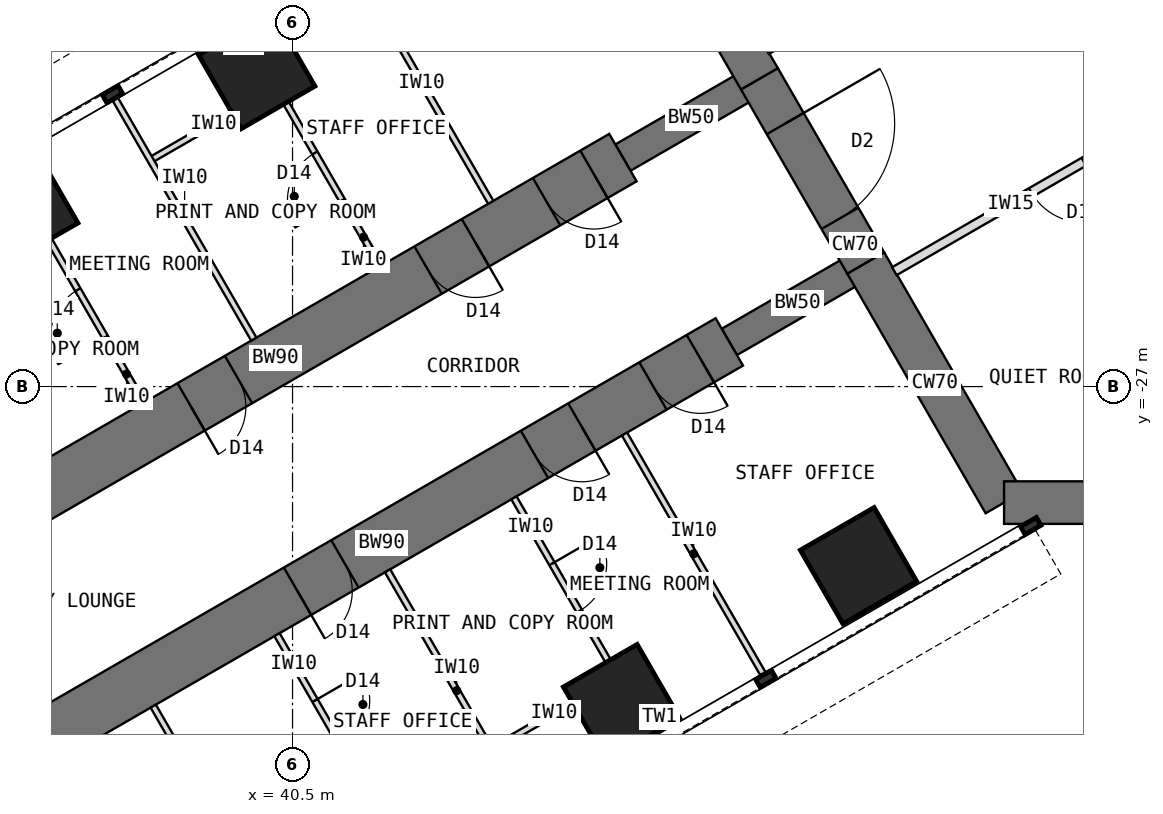
"""IFC4 building model, lengths in metres.
Left out: names, types, materials, properties, quantities, classifications, styles, units other than length and angle.
Written with IfcOpenShell. Run it as: python <this file> out.ifc"""

import sys

from ifc_helpers import new_model, si_unit, direction, frame, frame_2d, origin, origin_2d, place, context, subcontext, project, spatial, rectangle, extrude, element, fill, save


model = new_model("IFC4")
c1 = context("Model", 3, precision=1e-05, world=origin(), true_north=direction((0.0, 1.0)))
c2 = subcontext(c1, "Body", "Model", "MODEL_VIEW")
j1 = project(units=[si_unit("LENGTHUNIT", "METRE"), si_unit("PLANEANGLEUNIT", "RADIAN")], contexts=[c1])
p1 = place(None, origin())
s1 = spatial("IfcSite", under=j1, at=p1, CompositionType="ELEMENT")
p2 = place(p1, origin())
s2 = spatial("IfcBuilding", under=s1, at=p2, CompositionType="ELEMENT")
p3 = place(p2, frame((0.0, 0.0, 88.5)))
s3 = spatial("IfcBuildingStorey", under=s2, at=p3, CompositionType="ELEMENT", Elevation=88.5)
p4 = place(p3, frame((45.904, -18.0, 0.0), z_axis=(0.0, 0.0, 1.0), x_axis=(0.500024481964, -0.866011268655, 0.0)))
e1 = element("IfcWall", 1, at=p4, inside=s3, PredefinedType="SHEAR", context=c2, shape_type="SweptSolid", body=[
    extrude(rectangle(XDim=4.548, YDim=0.7, at=frame_2d((2.274, 0.0))), origin(), (0.0, 0.0, 1.0), 4.0),
])
p5 = place(p3, frame((48.178, -21.939, 0.0), z_axis=(0.0, 0.0, 1.0), x_axis=(0.500010275428, -0.866019471182, 0.0)))
e2 = element("IfcWall", 2, at=p5, inside=s3, PredefinedType="SHEAR", context=c2, shape_type="SweptSolid", body=[
    extrude(rectangle(XDim=3.5, YDim=0.7, at=frame_2d((1.75, 0.0))), origin(), (0.0, 0.0, 1.0), 4.0),
])
p6 = place(p5, frame((0.85, 0.0, 0.0)))
e3 = element("IfcOpeningElement", 3, at=p6, cuts=e2, PredefinedType="OPENING", context=c2, shape_type="SweptSolid", body=[
    extrude(rectangle(XDim=1.8, YDim=2.1, at=frame_2d((0.9, 1.05))), frame((0.0, 0.36, 0.0), z_axis=(0.0, -1.0, 0.0), x_axis=(1.0, 0.0, 0.0)), (0.0, 0.0, 1.0), 0.72),
])
p7 = place(p3, frame((49.928, -24.97, 0.0), z_axis=(0.0, 0.0, 1.0), x_axis=(0.499984222037, -0.866034513004, 0.0)))
e4 = element("IfcWall", 4, at=p7, inside=s3, PredefinedType="SHEAR", context=c2, shape_type="SweptSolid", body=[
    extrude(rectangle(XDim=4.548, YDim=0.7, at=frame_2d((2.274, 0.0))), origin(), (0.0, 0.0, 1.0), 4.0),
])
p8 = place(p3, frame((52.202, -28.908, 0.0), z_axis=(0.0, 0.0, 1.0), x_axis=(1.0, 0.0, 0.0)))
e5 = element("IfcWall", 5, at=p8, inside=s3, PredefinedType="SHEAR", context=c2, shape_type="SweptSolid", body=[
    extrude(rectangle(XDim=12.596, YDim=0.7, at=frame_2d((6.298, 0.0))), origin(), (0.0, 0.0, 1.0), 4.0),
])
p9 = place(p3, frame((49.928, -24.97, 0.0), z_axis=(0.0, 0.0, 1.0), x_axis=(-0.866031863473, -0.499988811324, 0.0)))
e6 = element("IfcWall", 6, at=p9, inside=s3, PredefinedType="SHEAR", context=c2, shape_type="SweptSolid", body=[
    extrude(rectangle(XDim=2.592, YDim=0.5, at=frame_2d((1.296, 0.0))), origin(), (0.0, 0.0, 1.0), 4.0),
])
p10 = place(p3, frame((47.684, -26.266, 0.0), z_axis=(0.0, 0.0, 1.0), x_axis=(-0.866027579429, -0.499996231654, 0.0)))
e7 = element("IfcWall", 7, at=p10, inside=s3, PredefinedType="SHEAR", context=c2, shape_type="SweptSolid", body=[
    extrude(rectangle(XDim=13.2, YDim=0.9, at=frame_2d((6.6, 0.0))), origin(), (0.0, 0.0, 1.0), 4.0),
])
p11 = place(p10, frame((0.55, 0.0, 0.0)))
e8 = element("IfcOpeningElement", 8, at=p11, cuts=e7, PredefinedType="OPENING", context=c2, shape_type="SweptSolid", body=[
    extrude(rectangle(XDim=0.9, YDim=2.1, at=frame_2d((0.45, 1.05))), frame((0.0, 0.46, 0.0), z_axis=(0.0, -1.0, 0.0), x_axis=(1.0, 0.0, 0.0)), (0.0, 0.0, 1.0), 0.92),
])
p12 = place(p10, frame((2.8, 0.0, 0.0)))
e9 = element("IfcOpeningElement", 9, at=p12, cuts=e7, PredefinedType="OPENING", context=c2, shape_type="SweptSolid", body=[
    extrude(rectangle(XDim=0.9, YDim=2.1, at=frame_2d((0.45, 1.05))), frame((0.0, 0.46, 0.0), z_axis=(0.0, -1.0, 0.0), x_axis=(1.0, 0.0, 0.0)), (0.0, 0.0, 1.0), 0.92),
])
p13 = place(p10, frame((7.3, 0.0, 0.0)))
e10 = element("IfcOpeningElement", 10, at=p13, cuts=e7, PredefinedType="OPENING", context=c2, shape_type="SweptSolid", body=[
    extrude(rectangle(XDim=0.9, YDim=2.1, at=frame_2d((0.45, 1.05))), frame((0.0, 0.46, 0.0), z_axis=(0.0, -1.0, 0.0), x_axis=(1.0, 0.0, 0.0)), (0.0, 0.0, 1.0), 0.92),
])
p14 = place(p3, frame((48.178, -21.939, 0.0), z_axis=(0.0, 0.0, 1.0), x_axis=(-0.866072649678, -0.499918158782, 0.0)))
e11 = element("IfcWall", 11, at=p14, inside=s3, PredefinedType="SHEAR", context=c2, shape_type="SweptSolid", body=[
    extrude(rectangle(XDim=2.592, YDim=0.5, at=frame_2d((1.296, 0.0))), origin(), (0.0, 0.0, 1.0), 4.0),
])
p15 = place(p3, frame((45.934, -23.234, 0.0), z_axis=(0.0, 0.0, 1.0), x_axis=(-0.866019570528, -0.500010103361, 0.0)))
e12 = element("IfcWall", 12, at=p15, inside=s3, PredefinedType="SHEAR", context=c2, shape_type="SweptSolid", body=[
    extrude(rectangle(XDim=13.2, YDim=0.9, at=frame_2d((6.6, 0.0))), origin(), (0.0, 0.0, 1.0), 4.0),
])
p16 = place(p15, frame((0.55, 0.0, 0.0)))
e13 = element("IfcOpeningElement", 13, at=p16, cuts=e12, PredefinedType="OPENING", context=c2, shape_type="SweptSolid", body=[
    extrude(rectangle(XDim=0.9, YDim=2.1, at=frame_2d((0.45, 1.05))), frame((0.0, 0.46, 0.0), z_axis=(0.0, -1.0, 0.0), x_axis=(1.0, 0.0, 0.0)), (0.0, 0.0, 1.0), 0.92),
])
p17 = place(p15, frame((2.8, 0.0, 0.0)))
e14 = element("IfcOpeningElement", 14, at=p17, cuts=e12, PredefinedType="OPENING", context=c2, shape_type="SweptSolid", body=[
    extrude(rectangle(XDim=0.9, YDim=2.1, at=frame_2d((0.45, 1.05))), frame((0.0, 0.46, 0.0), z_axis=(0.0, -1.0, 0.0), x_axis=(1.0, 0.0, 0.0)), (0.0, 0.0, 1.0), 0.92),
])
p18 = place(p15, frame((7.3, 0.0, 0.0)))
e15 = element("IfcOpeningElement", 15, at=p18, cuts=e12, PredefinedType="OPENING", context=c2, shape_type="SweptSolid", body=[
    extrude(rectangle(XDim=0.9, YDim=2.1, at=frame_2d((0.45, 1.05))), frame((0.0, 0.46, 0.0), z_axis=(0.0, -1.0, 0.0), x_axis=(1.0, 0.0, 0.0)), (0.0, 0.0, 1.0), 0.92),
])
for number, where, z_axis, x_axis in (
    (16, (49.809, -29.946, 0.0), (0.0, 0.0, 1.0), (0.866, 0.5, 0.0)),
    (17, (45.912, -32.196, 0.0), (0.0, 0.0, 1.0), (0.866, 0.5, 0.0)),
    (18, (39.912, -21.804, 0.0), (0.0, 0.0, 1.0), (0.866, 0.5, 0.0)),
    (19, (36.014, -24.054, 0.0), (0.0, 0.0, 1.0), (0.866, 0.5, 0.0)),
):
    element("IfcColumn", number, at=place(p3, frame(where, z_axis=z_axis, x_axis=x_axis)), inside=s3, PredefinedType="COLUMN", context=c2, shape_type="SweptSolid", body=[
        extrude(rectangle(XDim=1.4, YDim=1.4, at=origin_2d()), origin(), (0.0, 0.0, 1.0), 4.0),
    ])
for number, where, z_axis, x_axis in (
    (20, (45.96, -27.78, 0.0), (0.0, 0.0, 1.0), (0.5, -0.866, 0.0)),
    (21, (42.063, -30.03, 0.0), (0.0, 0.0, 1.0), (0.5, -0.866, 0.0)),
):
    element("IfcWall", number, at=place(p3, frame(where, z_axis=z_axis, x_axis=x_axis)), inside=s3, PredefinedType="PARTITIONING", context=c2, shape_type="SweptSolid", body=[
        extrude(rectangle(XDim=4.55, YDim=0.1, at=frame_2d((2.275, 0.0))), origin(), (0.0, 0.0, 1.0), 3.7),
    ])
p19 = place(p3, frame((45.842, -31.775, 0.0), z_axis=(0.0, 0.0, 1.0), x_axis=(-0.866006032174, -0.500033551112, 0.0)))
e22 = element("IfcWall", 22, at=p19, inside=s3, PredefinedType="PARTITIONING", context=c2, shape_type="SweptSolid", body=[
    extrude(rectangle(XDim=2.4, YDim=0.1, at=frame_2d((1.2, 0.0))), origin(), (0.0, 0.0, 1.0), 3.7),
])
p20 = place(p3, frame((44.141, -28.83, 0.0), z_axis=(0.0, 0.0, 1.0), x_axis=(0.500062241894, -0.865989465428, 0.0)))
e23 = element("IfcWall", 23, at=p20, inside=s3, PredefinedType="PARTITIONING", context=c2, shape_type="SweptSolid", body=[
    extrude(rectangle(XDim=3.4, YDim=0.1, at=frame_2d((1.7, 0.0))), origin(), (0.0, 0.0, 1.0), 3.7),
])
p21 = place(p20, frame((1.25, 0.0, 0.0)))
e24 = element("IfcOpeningElement", 24, at=p21, cuts=e23, PredefinedType="OPENING", context=c2, shape_type="SweptSolid", body=[
    extrude(rectangle(XDim=0.9, YDim=2.1, at=frame_2d((0.45, 1.05))), frame((0.0, 0.06, 0.0), z_axis=(0.0, -1.0, 0.0), x_axis=(1.0, 0.0, 0.0)), (0.0, 0.0, 1.0), 0.12),
])
p22 = place(p3, frame((40.244, -31.08, 0.0), z_axis=(0.0, 0.0, 1.0), x_axis=(0.500008388397, -0.866020560687, 0.0)))
e25 = element("IfcWall", 25, at=p22, inside=s3, PredefinedType="PARTITIONING", context=c2, shape_type="SweptSolid", body=[
    extrude(rectangle(XDim=3.4, YDim=0.1, at=frame_2d((1.7, 0.0))), origin(), (0.0, 0.0, 1.0), 3.7),
])
p23 = place(p22, frame((1.25, 0.0, 0.0)))
e26 = element("IfcOpeningElement", 26, at=p23, cuts=e25, PredefinedType="OPENING", context=c2, shape_type="SweptSolid", body=[
    extrude(rectangle(XDim=0.9, YDim=2.1, at=frame_2d((0.45, 1.05))), frame((0.0, 0.06, 0.0), z_axis=(0.0, -1.0, 0.0), x_axis=(1.0, 0.0, 0.0)), (0.0, 0.0, 1.0), 0.12),
])
p24 = place(p3, frame((38.209, -32.255, 0.0), z_axis=(0.0, 0.0, 1.0), x_axis=(0.500008388397, -0.866020560687, 0.0)))
e27 = element("IfcWall", 27, at=p24, inside=s3, PredefinedType="PARTITIONING", context=c2, shape_type="SweptSolid", body=[
    extrude(rectangle(XDim=3.4, YDim=0.1, at=frame_2d((1.7, 0.0))), origin(), (0.0, 0.0, 1.0), 3.7),
])
for number, where, z_axis, x_axis in (
    (28, (43.76, -23.97, 0.0), (0.0, 0.0, 1.0), (-0.5, 0.866, 0.0)),
    (29, (39.863, -26.22, 0.0), (0.0, 0.0, 1.0), (-0.5, 0.866, 0.0)),
):
    element("IfcWall", number, at=place(p3, frame(where, z_axis=z_axis, x_axis=x_axis)), inside=s3, PredefinedType="PARTITIONING", context=c2, shape_type="SweptSolid", body=[
        extrude(rectangle(XDim=4.55, YDim=0.1, at=frame_2d((2.275, 0.0))), origin(), (0.0, 0.0, 1.0), 3.7),
    ])
p25 = place(p3, frame((40.241, -22.075, 0.0), z_axis=(0.0, 0.0, 1.0), x_axis=(-0.866024647952, -0.500001309137, 0.0)))
e30 = element("IfcWall", 30, at=p25, inside=s3, PredefinedType="PARTITIONING", context=c2, shape_type="SweptSolid", body=[
    extrude(rectangle(XDim=2.4, YDim=0.1, at=frame_2d((1.2, 0.0))), origin(), (0.0, 0.0, 1.0), 3.7),
])
p26 = place(p3, frame((41.941, -25.02, 0.0), z_axis=(0.0, 0.0, 1.0), x_axis=(-0.499977295307, 0.866038511948, 0.0)))
e31 = element("IfcWall", 31, at=p26, inside=s3, PredefinedType="PARTITIONING", context=c2, shape_type="SweptSolid", body=[
    extrude(rectangle(XDim=3.4, YDim=0.1, at=frame_2d((1.7, 0.0))), origin(), (0.0, 0.0, 1.0), 3.7),
])
p27 = place(p26, frame((1.25, 0.0, 0.0)))
e32 = element("IfcOpeningElement", 32, at=p27, cuts=e31, PredefinedType="OPENING", context=c2, shape_type="SweptSolid", body=[
    extrude(rectangle(XDim=0.9, YDim=2.1, at=frame_2d((0.45, 1.05))), frame((0.0, 0.06, 0.0), z_axis=(0.0, -1.0, 0.0), x_axis=(1.0, 0.0, 0.0)), (0.0, 0.0, 1.0), 0.12),
])
p28 = place(p3, frame((38.044, -27.27, 0.0), z_axis=(0.0, 0.0, 1.0), x_axis=(-0.500031147688, 0.866007419912, 0.0)))
e33 = element("IfcWall", 33, at=p28, inside=s3, PredefinedType="PARTITIONING", context=c2, shape_type="SweptSolid", body=[
    extrude(rectangle(XDim=3.4, YDim=0.1, at=frame_2d((1.7, 0.0))), origin(), (0.0, 0.0, 1.0), 3.7),
])
p29 = place(p28, frame((1.25, 0.0, 0.0)))
e34 = element("IfcOpeningElement", 34, at=p29, cuts=e33, PredefinedType="OPENING", context=c2, shape_type="SweptSolid", body=[
    extrude(rectangle(XDim=0.9, YDim=2.1, at=frame_2d((0.45, 1.05))), frame((0.0, 0.06, 0.0), z_axis=(0.0, -1.0, 0.0), x_axis=(1.0, 0.0, 0.0)), (0.0, 0.0, 1.0), 0.12),
])
p30 = place(p3, frame((48.298, -21.466, 0.0), z_axis=(0.0, 0.0, 1.0), x_axis=(0.866021148949, 0.500007369519, 0.0)))
e35 = element("IfcWall", 35, at=p30, inside=s3, PredefinedType="PARTITIONING", context=c2, shape_type="SweptSolid", body=[
    extrude(rectangle(XDim=4.426, YDim=0.15, at=frame_2d((2.213, 0.0))), origin(), (0.0, 0.0, 1.0), 3.7),
])
p31 = place(p30, frame((2.598, 0.0, 0.0)))
e36 = element("IfcOpeningElement", 36, at=p31, cuts=e35, PredefinedType="OPENING", context=c2, shape_type="SweptSolid", body=[
    extrude(rectangle(XDim=1.0, YDim=2.1, at=frame_2d((0.5, 1.05))), frame((0.0, 0.085, 0.0), z_axis=(0.0, -1.0, 0.0), x_axis=(1.0, 0.0, 0.0)), (0.0, 0.0, 1.0), 0.17),
])
p32 = place(p3, frame((54.23, -22.89, 0.0), z_axis=(0.0, 0.0, 1.0), x_axis=(-0.866021148949, -0.500007369519, 0.0)))
e37 = element("IfcWall", 37, at=p32, inside=s3, PredefinedType="PARTITIONING", context=c2, shape_type="SweptSolid", body=[
    extrude(rectangle(XDim=4.426, YDim=0.15, at=frame_2d((2.213, 0.0))), origin(), (0.0, 0.0, 1.0), 3.7),
])
p33 = place(p32, frame((0.828, 0.0, 0.0)))
e38 = element("IfcOpeningElement", 38, at=p33, cuts=e37, PredefinedType="OPENING", context=c2, shape_type="SweptSolid", body=[
    extrude(rectangle(XDim=1.0, YDim=2.1, at=frame_2d((0.5, 1.05))), frame((0.0, 0.085, 0.0), z_axis=(0.0, -1.0, 0.0), x_axis=(1.0, 0.0, 0.0)), (0.0, 0.0, 1.0), 0.17),
])
p34 = place(p6, origin())
e39 = element("IfcDoor", 39, at=p34, inside=s3, OperationType="DOUBLE_DOOR_DOUBLE_SWING", PredefinedType="DOOR", context=c2, shape_type="SweptSolid", body=[
    extrude(rectangle(XDim=1.72, YDim=2.06, at=frame_2d((0.9, 1.03))), frame((0.0, 0.025, 0.0), z_axis=(0.0, -1.0, 0.0), x_axis=(1.0, 0.0, 0.0)), (0.0, 0.0, 1.0), 0.05),
    extrude(rectangle(XDim=0.04, YDim=2.1, at=frame_2d((0.02, 1.05))), frame((0.0, 0.35, 0.0), z_axis=(0.0, -1.0, 0.0), x_axis=(1.0, 0.0, 0.0)), (0.0, 0.0, 1.0), 0.699),
    extrude(rectangle(XDim=0.04, YDim=2.1, at=frame_2d((1.78, 1.05))), frame((0.0, 0.35, 0.0), z_axis=(0.0, -1.0, 0.0), x_axis=(1.0, 0.0, 0.0)), (0.0, 0.0, 1.0), 0.699),
    extrude(rectangle(XDim=1.72, YDim=0.04, at=frame_2d((0.9, 2.08))), frame((0.0, 0.35, 0.0), z_axis=(0.0, -1.0, 0.0), x_axis=(1.0, 0.0, 0.0)), (0.0, 0.0, 1.0), 0.699),
])
fill(e3, e39)
p35 = place(p21, origin())
e40 = element("IfcDoor", 40, at=p35, inside=s3, OperationType="SINGLE_SWING_LEFT", PredefinedType="DOOR", context=c2, shape_type="SweptSolid", body=[
    extrude(rectangle(XDim=0.9, YDim=2.1, at=frame_2d((0.45, 1.05))), frame((0.0, 0.025, 0.0), z_axis=(0.0, -1.0, 0.0), x_axis=(1.0, 0.0, 0.0)), (0.0, 0.0, 1.0), 0.05),
])
fill(e24, e40)
p36 = place(p23, origin())
e41 = element("IfcDoor", 41, at=p36, inside=s3, OperationType="SINGLE_SWING_LEFT", PredefinedType="DOOR", context=c2, shape_type="SweptSolid", body=[
    extrude(rectangle(XDim=0.9, YDim=2.1, at=frame_2d((0.45, 1.05))), frame((0.0, 0.025, 0.0), z_axis=(0.0, -1.0, 0.0), x_axis=(1.0, 0.0, 0.0)), (0.0, 0.0, 1.0), 0.05),
])
fill(e26, e41)
p37 = place(p27, origin())
e42 = element("IfcDoor", 42, at=p37, inside=s3, OperationType="SINGLE_SWING_LEFT", PredefinedType="DOOR", context=c2, shape_type="SweptSolid", body=[
    extrude(rectangle(XDim=0.9, YDim=2.1, at=frame_2d((0.45, 1.05))), frame((0.0, 0.025, 0.0), z_axis=(0.0, -1.0, 0.0), x_axis=(1.0, 0.0, 0.0)), (0.0, 0.0, 1.0), 0.05),
])
fill(e32, e42)
p38 = place(p29, origin())
e43 = element("IfcDoor", 43, at=p38, inside=s3, OperationType="SINGLE_SWING_LEFT", PredefinedType="DOOR", context=c2, shape_type="SweptSolid", body=[
    extrude(rectangle(XDim=0.9, YDim=2.1, at=frame_2d((0.45, 1.05))), frame((0.0, 0.025, 0.0), z_axis=(0.0, -1.0, 0.0), x_axis=(1.0, 0.0, 0.0)), (0.0, 0.0, 1.0), 0.05),
])
fill(e34, e43)
p39 = place(p33, origin())
e44 = element("IfcDoor", 44, at=p39, inside=s3, OperationType="SINGLE_SWING_LEFT", PredefinedType="DOOR", context=c2, shape_type="SweptSolid", body=[
    extrude(rectangle(XDim=1.0, YDim=2.1, at=frame_2d((0.5, 1.05))), frame((0.0, 0.025, 0.0), z_axis=(0.0, -1.0, 0.0), x_axis=(1.0, 0.0, 0.0)), (0.0, 0.0, 1.0), 0.05),
])
fill(e38, e44)
p40 = place(p11, origin())
e45 = element("IfcDoor", 45, at=p40, inside=s3, OperationType="SINGLE_SWING_LEFT", PredefinedType="DOOR", context=c2, shape_type="SweptSolid", body=[
    extrude(rectangle(XDim=0.82, YDim=2.06, at=frame_2d((0.45, 1.03))), frame((0.0, 0.025, 0.0), z_axis=(0.0, -1.0, 0.0), x_axis=(1.0, 0.0, 0.0)), (0.0, 0.0, 1.0), 0.05),
    extrude(rectangle(XDim=0.04, YDim=2.1, at=frame_2d((0.02, 1.05))), frame((0.0, 0.45, 0.0), z_axis=(0.0, -1.0, 0.0), x_axis=(1.0, 0.0, 0.0)), (0.0, 0.0, 1.0), 0.899),
    extrude(rectangle(XDim=0.04, YDim=2.1, at=frame_2d((0.88, 1.05))), frame((0.0, 0.45, 0.0), z_axis=(0.0, -1.0, 0.0), x_axis=(1.0, 0.0, 0.0)), (0.0, 0.0, 1.0), 0.899),
    extrude(rectangle(XDim=0.82, YDim=0.04, at=frame_2d((0.45, 2.08))), frame((0.0, 0.45, 0.0), z_axis=(0.0, -1.0, 0.0), x_axis=(1.0, 0.0, 0.0)), (0.0, 0.0, 1.0), 0.899),
])
fill(e8, e45)
p41 = place(p12, origin())
e46 = element("IfcDoor", 46, at=p41, inside=s3, OperationType="SINGLE_SWING_LEFT", PredefinedType="DOOR", context=c2, shape_type="SweptSolid", body=[
    extrude(rectangle(XDim=0.82, YDim=2.06, at=frame_2d((0.45, 1.03))), frame((0.0, 0.025, 0.0), z_axis=(0.0, -1.0, 0.0), x_axis=(1.0, 0.0, 0.0)), (0.0, 0.0, 1.0), 0.05),
    extrude(rectangle(XDim=0.04, YDim=2.1, at=frame_2d((0.02, 1.05))), frame((0.0, 0.45, 0.0), z_axis=(0.0, -1.0, 0.0), x_axis=(1.0, 0.0, 0.0)), (0.0, 0.0, 1.0), 0.899),
    extrude(rectangle(XDim=0.04, YDim=2.1, at=frame_2d((0.88, 1.05))), frame((0.0, 0.45, 0.0), z_axis=(0.0, -1.0, 0.0), x_axis=(1.0, 0.0, 0.0)), (0.0, 0.0, 1.0), 0.899),
    extrude(rectangle(XDim=0.82, YDim=0.04, at=frame_2d((0.45, 2.08))), frame((0.0, 0.45, 0.0), z_axis=(0.0, -1.0, 0.0), x_axis=(1.0, 0.0, 0.0)), (0.0, 0.0, 1.0), 0.899),
])
fill(e9, e46)
p42 = place(p13, origin())
e47 = element("IfcDoor", 47, at=p42, inside=s3, OperationType="SINGLE_SWING_RIGHT", PredefinedType="DOOR", context=c2, shape_type="SweptSolid", body=[
    extrude(rectangle(XDim=0.82, YDim=2.06, at=frame_2d((0.45, 1.03))), frame((0.0, 0.025, 0.0), z_axis=(0.0, -1.0, 0.0), x_axis=(1.0, 0.0, 0.0)), (0.0, 0.0, 1.0), 0.05),
    extrude(rectangle(XDim=0.04, YDim=2.1, at=frame_2d((0.02, 1.05))), frame((0.0, 0.45, 0.0), z_axis=(0.0, -1.0, 0.0), x_axis=(1.0, 0.0, 0.0)), (0.0, 0.0, 1.0), 0.899),
    extrude(rectangle(XDim=0.04, YDim=2.1, at=frame_2d((0.88, 1.05))), frame((0.0, 0.45, 0.0), z_axis=(0.0, -1.0, 0.0), x_axis=(1.0, 0.0, 0.0)), (0.0, 0.0, 1.0), 0.899),
    extrude(rectangle(XDim=0.82, YDim=0.04, at=frame_2d((0.45, 2.08))), frame((0.0, 0.45, 0.0), z_axis=(0.0, -1.0, 0.0), x_axis=(1.0, 0.0, 0.0)), (0.0, 0.0, 1.0), 0.899),
])
fill(e10, e47)
p43 = place(p16, origin())
e48 = element("IfcDoor", 48, at=p43, inside=s3, OperationType="SINGLE_SWING_LEFT", PredefinedType="DOOR", context=c2, shape_type="SweptSolid", body=[
    extrude(rectangle(XDim=0.82, YDim=2.06, at=frame_2d((0.45, 1.03))), frame((0.0, 0.025, 0.0), z_axis=(0.0, -1.0, 0.0), x_axis=(1.0, 0.0, 0.0)), (0.0, 0.0, 1.0), 0.05),
    extrude(rectangle(XDim=0.04, YDim=2.1, at=frame_2d((0.02, 1.05))), frame((0.0, 0.45, 0.0), z_axis=(0.0, -1.0, 0.0), x_axis=(1.0, 0.0, 0.0)), (0.0, 0.0, 1.0), 0.899),
    extrude(rectangle(XDim=0.04, YDim=2.1, at=frame_2d((0.88, 1.05))), frame((0.0, 0.45, 0.0), z_axis=(0.0, -1.0, 0.0), x_axis=(1.0, 0.0, 0.0)), (0.0, 0.0, 1.0), 0.899),
    extrude(rectangle(XDim=0.82, YDim=0.04, at=frame_2d((0.45, 2.08))), frame((0.0, 0.45, 0.0), z_axis=(0.0, -1.0, 0.0), x_axis=(1.0, 0.0, 0.0)), (0.0, 0.0, 1.0), 0.899),
])
fill(e13, e48)
p44 = place(p17, origin())
e49 = element("IfcDoor", 49, at=p44, inside=s3, OperationType="SINGLE_SWING_LEFT", PredefinedType="DOOR", context=c2, shape_type="SweptSolid", body=[
    extrude(rectangle(XDim=0.82, YDim=2.06, at=frame_2d((0.45, 1.03))), frame((0.0, 0.025, 0.0), z_axis=(0.0, -1.0, 0.0), x_axis=(1.0, 0.0, 0.0)), (0.0, 0.0, 1.0), 0.05),
    extrude(rectangle(XDim=0.04, YDim=2.1, at=frame_2d((0.02, 1.05))), frame((0.0, 0.45, 0.0), z_axis=(0.0, -1.0, 0.0), x_axis=(1.0, 0.0, 0.0)), (0.0, 0.0, 1.0), 0.899),
    extrude(rectangle(XDim=0.04, YDim=2.1, at=frame_2d((0.88, 1.05))), frame((0.0, 0.45, 0.0), z_axis=(0.0, -1.0, 0.0), x_axis=(1.0, 0.0, 0.0)), (0.0, 0.0, 1.0), 0.899),
    extrude(rectangle(XDim=0.82, YDim=0.04, at=frame_2d((0.45, 2.08))), frame((0.0, 0.45, 0.0), z_axis=(0.0, -1.0, 0.0), x_axis=(1.0, 0.0, 0.0)), (0.0, 0.0, 1.0), 0.899),
])
fill(e14, e49)
p45 = place(p18, origin())
e50 = element("IfcDoor", 50, at=p45, inside=s3, OperationType="SINGLE_SWING_RIGHT", PredefinedType="DOOR", context=c2, shape_type="SweptSolid", body=[
    extrude(rectangle(XDim=0.82, YDim=2.06, at=frame_2d((0.45, 1.03))), frame((0.0, 0.025, 0.0), z_axis=(0.0, -1.0, 0.0), x_axis=(1.0, 0.0, 0.0)), (0.0, 0.0, 1.0), 0.05),
    extrude(rectangle(XDim=0.04, YDim=2.1, at=frame_2d((0.02, 1.05))), frame((0.0, 0.45, 0.0), z_axis=(0.0, -1.0, 0.0), x_axis=(1.0, 0.0, 0.0)), (0.0, 0.0, 1.0), 0.899),
    extrude(rectangle(XDim=0.04, YDim=2.1, at=frame_2d((0.88, 1.05))), frame((0.0, 0.45, 0.0), z_axis=(0.0, -1.0, 0.0), x_axis=(1.0, 0.0, 0.0)), (0.0, 0.0, 1.0), 0.899),
    extrude(rectangle(XDim=0.82, YDim=0.04, at=frame_2d((0.45, 2.08))), frame((0.0, 0.45, 0.0), z_axis=(0.0, -1.0, 0.0), x_axis=(1.0, 0.0, 0.0)), (0.0, 0.0, 1.0), 0.899),
])
fill(e15, e50)
save(model, sys.argv[1])
